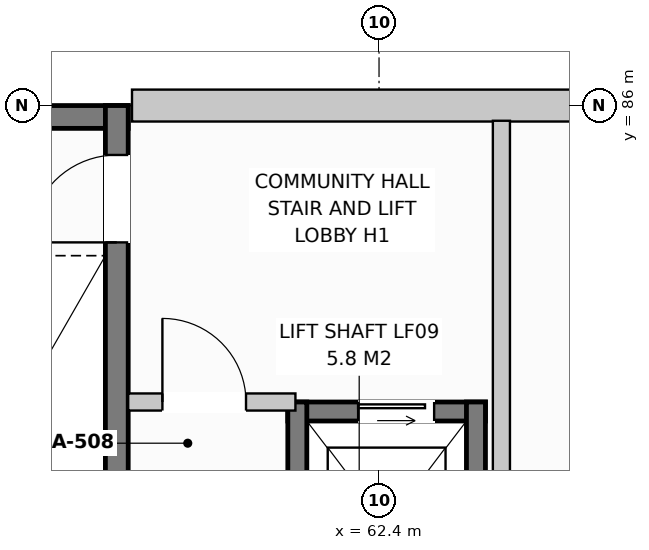
"""IFC4 building model, lengths in metres.
Left out: names, types, materials, properties, quantities, classifications, styles, units other than length and angle.
Written with IfcOpenShell. Run it as: python <this file> out.ifc"""

import sys

from ifc_helpers import new_model, si_unit, direction, frame, frame_2d, origin, origin_with_axes, place, context, subcontext, project, spatial, rectangle, extrude, element, fill, save


model = new_model("IFC4")
c1 = context("Model", 3, precision=1e-05, world=origin(), true_north=direction((0.0, 1.0)))
c2 = subcontext(c1, "Body", "Model", "MODEL_VIEW")
j1 = project(units=[si_unit("LENGTHUNIT", "METRE"), si_unit("PLANEANGLEUNIT", "RADIAN")], contexts=[c1])
p1 = place(None, origin())
s1 = spatial("IfcSite", under=j1, at=p1, CompositionType="ELEMENT")
p2 = place(p1, origin())
s2 = spatial("IfcBuilding", under=s1, at=p2, CompositionType="ELEMENT")
p3 = place(p2, frame((0.0, 0.0, 4.4)))
s3 = spatial("IfcBuildingStorey", under=s2, at=p3, CompositionType="ELEMENT", Elevation=4.4)
p4 = place(p3, frame((59.15, 86.0, 0.0), z_axis=(0.0, 0.0, 1.0), x_axis=(1.0, 0.0, 0.0)))
e1 = element("IfcWall", 1, at=p4, inside=s3, PredefinedType="STANDARD", context=c2, shape_type="SweptSolid", body=[
    extrude(rectangle(XDim=12.0, YDim=0.42, at=frame_2d((6.0, 0.0))), origin(), (0.0, 0.0, 1.0), 2.545),
])
p5 = place(p4, frame((5.9, 0.0, 0.72)))
e2 = element("IfcOpeningElement", 2, at=p5, cuts=e1, PredefinedType="OPENING", context=c2, shape_type="SweptSolid", body=[
    extrude(rectangle(XDim=2.2, YDim=1.35, at=frame_2d((1.1, 0.675))), frame((0.0, 0.222, 0.0), z_axis=(0.0, -1.0, 0.0), x_axis=(1.0, 0.0, 0.0)), (0.0, 0.0, 1.0), 0.444),
])
p6 = place(p3, frame((55.5, 85.85, 0.0), z_axis=(0.0, 0.0, 1.0), x_axis=(1.0, 0.0, 0.0)))
e3 = element("IfcWall", 3, at=p6, inside=s3, PredefinedType="SHEAR", context=c2, shape_type="SweptSolid", body=[
    extrude(rectangle(XDim=3.6, YDim=0.3, at=frame_2d((1.8, 0.0))), origin(), (0.0, 0.0, 1.0), 3.33),
])
p7 = place(p3, frame((58.95, 78.5, 0.0), z_axis=(0.0, 0.0, 1.0), x_axis=(0.0, 1.0, 0.0)))
e4 = element("IfcWall", 4, at=p7, inside=s3, PredefinedType="SHEAR", context=c2, shape_type="SweptSolid", body=[
    extrude(rectangle(XDim=7.5, YDim=0.3, at=frame_2d((3.75, 0.0))), origin(), (0.0, 0.0, 1.0), 3.33),
])
p8 = place(p7, frame((5.7, 0.0, 0.0)))
e5 = element("IfcOpeningElement", 5, at=p8, cuts=e4, PredefinedType="OPENING", context=c2, shape_type="SweptSolid", body=[
    extrude(rectangle(XDim=1.15, YDim=2.15, at=frame_2d((0.575, 1.075))), frame((0.0, 0.162, 0.0), z_axis=(0.0, -1.0, 0.0), x_axis=(1.0, 0.0, 0.0)), (0.0, 0.0, 1.0), 0.324),
])
p9 = place(p3, frame((61.2, 81.975, 0.0), z_axis=(0.0, 0.0, 1.0), x_axis=(1.0, 0.0, 0.0)))
e6 = element("IfcWall", 6, at=p9, inside=s3, PredefinedType="SHEAR", context=c2, shape_type="SweptSolid", body=[
    extrude(rectangle(XDim=2.6, YDim=0.25, at=frame_2d((1.3, 0.0))), origin(), (0.0, 0.0, 1.0), 3.33),
])
p10 = place(p9, frame((0.925, 0.0, 0.0)))
e7 = element("IfcOpeningElement", 7, at=p10, cuts=e6, PredefinedType="OPENING", context=c2, shape_type="SweptSolid", body=[
    extrude(rectangle(XDim=1.0, YDim=2.1, at=frame_2d((0.5, 1.05))), frame((0.0, 0.137, 0.0), z_axis=(0.0, -1.0, 0.0), x_axis=(1.0, 0.0, 0.0)), (0.0, 0.0, 1.0), 0.274),
])
for number, where, z_axis, x_axis in (
    (8, (61.325, 78.85, 0.0), (0.0, 0.0, 1.0), (0.0, 1.0, 0.0)),
    (9, (63.675, 78.85, 0.0), (0.0, 0.0, 1.0), (0.0, 1.0, 0.0)),
):
    element("IfcWall", number, at=place(p3, frame(where, z_axis=z_axis, x_axis=x_axis)), inside=s3, PredefinedType="SHEAR", context=c2, shape_type="SweptSolid", body=[
        extrude(rectangle(XDim=3.25, YDim=0.25, at=frame_2d((1.625, 0.0))), origin(), (0.0, 0.0, 1.0), 3.33),
    ])
p11 = place(p3, frame((64.01, 78.2, 0.0), z_axis=(0.0, 0.0, 1.0), x_axis=(0.0, 1.0, 0.0)))
e10 = element("IfcWall", 10, at=p11, inside=s3, PredefinedType="PARTITIONING", context=c2, shape_type="SweptSolid", body=[
    extrude(rectangle(XDim=7.6, YDim=0.225, at=frame_2d((3.8, 0.0))), origin(), (0.0, 0.0, 1.0), 3.33),
])
p12 = place(p3, frame((59.1, 82.1, 0.0), z_axis=(0.0, 0.0, 1.0), x_axis=(1.0, 0.0, 0.0)))
e11 = element("IfcWall", 11, at=p12, inside=s3, PredefinedType="PARTITIONING", context=c2, shape_type="SweptSolid", body=[
    extrude(rectangle(XDim=2.2, YDim=0.225, at=frame_2d((1.1, 0.0))), origin(), (0.0, 0.0, 1.0), 3.33),
])
p13 = place(p12, frame((0.45, 0.0, 0.0)))
e12 = element("IfcOpeningElement", 12, at=p13, cuts=e11, PredefinedType="OPENING", context=c2, shape_type="SweptSolid", body=[
    extrude(rectangle(XDim=1.1, YDim=2.15, at=frame_2d((0.55, 1.075))), frame((0.0, 0.125, 0.0), z_axis=(0.0, -1.0, 0.0), x_axis=(1.0, 0.0, 0.0)), (0.0, 0.0, 1.0), 0.249),
])
p14 = place(p8, origin_with_axes())
e13 = element("IfcDoor", 13, at=p14, inside=s3, OperationType="SINGLE_SWING_LEFT", PredefinedType="DOOR", context=c2, shape_type="SweptSolid", body=[
    extrude(rectangle(XDim=1.15, YDim=2.15, at=frame_2d((0.575, 1.075))), frame((0.0, 0.025, 0.0), z_axis=(0.0, -1.0, 0.0), x_axis=(1.0, 0.0, 0.0)), (0.0, 0.0, 1.0), 0.05),
])
fill(e5, e13)
p15 = place(p10, origin_with_axes())
e14 = element("IfcDoor", 14, at=p15, inside=s3, OperationType="SLIDING_TO_LEFT", PredefinedType="DOOR", context=c2, shape_type="SweptSolid", body=[
    extrude(rectangle(XDim=1.0, YDim=2.1, at=frame_2d((0.5, 1.05))), frame((0.0, 0.025, 0.0), z_axis=(0.0, -1.0, 0.0), x_axis=(1.0, 0.0, 0.0)), (0.0, 0.0, 1.0), 0.05),
])
fill(e7, e14)
p16 = place(p13, origin_with_axes())
e15 = element("IfcDoor", 15, at=p16, inside=s3, OperationType="SINGLE_SWING_LEFT", PredefinedType="DOOR", context=c2, shape_type="SweptSolid", body=[
    extrude(rectangle(XDim=1.1, YDim=2.15, at=frame_2d((0.55, 1.075))), frame((0.0, 0.025, 0.0), z_axis=(0.0, -1.0, 0.0), x_axis=(1.0, 0.0, 0.0)), (0.0, 0.0, 1.0), 0.05),
])
fill(e12, e15)
save(model, sys.argv[1])
